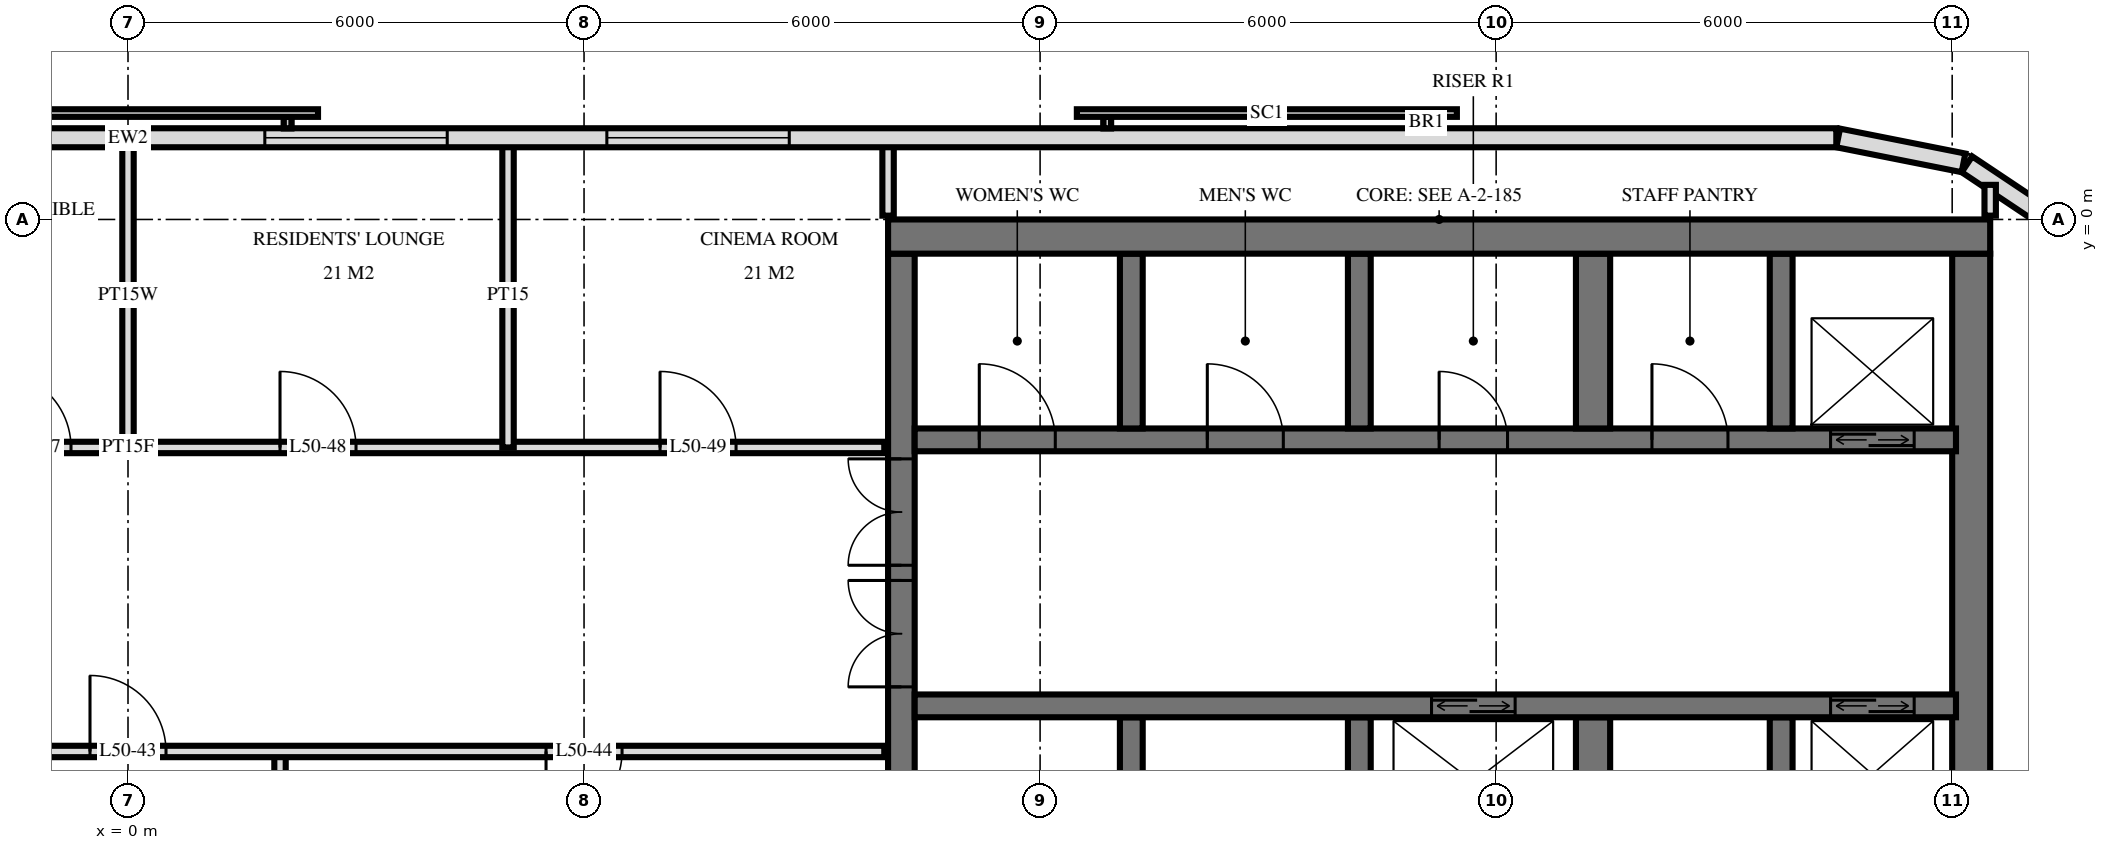
"""IFC4 building model, lengths in metres.
Left out: names, types, materials, properties, quantities, classifications, styles, units other than length and angle.
Written with IfcOpenShell. Run it as: python <this file> out.ifc"""

import sys

from ifc_helpers import new_model, si_unit, direction, frame, frame_2d, origin, place, context, subcontext, project, spatial, rectangle, extrude, element, fill, save


model = new_model("IFC4")
c1 = context("Model", 3, precision=1e-05, world=origin(), true_north=direction((0.0, 1.0)))
c2 = subcontext(c1, "Body", "Model", "MODEL_VIEW")
j1 = project(units=[si_unit("LENGTHUNIT", "METRE"), si_unit("PLANEANGLEUNIT", "RADIAN")], contexts=[c1])
p1 = place(None, origin())
s1 = spatial("IfcSite", under=j1, at=p1, CompositionType="ELEMENT")
p2 = place(p1, origin())
s2 = spatial("IfcBuilding", under=s1, at=p2, CompositionType="ELEMENT")
p3 = place(p2, frame((0.0, 0.0, 194.1)))
s3 = spatial("IfcBuildingStorey", under=s2, at=p3, CompositionType="ELEMENT", Elevation=194.1)
p4 = place(p3, frame((10.0, -0.225, 0.0), z_axis=(0.0, 0.0, 1.0), x_axis=(1.0, 0.0, 0.0)))
e1 = element("IfcWall", 1, at=p4, inside=s3, PredefinedType="SHEAR", context=c2, shape_type="SweptSolid", body=[
    extrude(rectangle(XDim=14.5, YDim=0.45, at=frame_2d((7.25, 0.0))), origin(), (0.0, 0.0, 1.0), 3.5),
])
p5 = place(p3, frame((10.175, -14.55, 0.0), z_axis=(0.0, 0.0, 1.0), x_axis=(0.0, 1.0, 0.0)))
e2 = element("IfcWall", 2, at=p5, inside=s3, PredefinedType="SHEAR", context=c2, shape_type="SweptSolid", body=[
    extrude(rectangle(XDim=14.1, YDim=0.35, at=frame_2d((7.05, 0.0))), origin(), (0.0, 0.0, 1.0), 3.5),
])
p6 = place(p5, frame((8.4, 0.0, 0.0)))
e3 = element("IfcOpeningElement", 3, at=p6, cuts=e2, PredefinedType="OPENING", context=c2, shape_type="SweptSolid", body=[
    extrude(rectangle(XDim=1.4, YDim=2.4, at=frame_2d((0.7, 1.2))), frame((0.0, 0.185, 0.0), z_axis=(0.0, -1.0, 0.0), x_axis=(1.0, 0.0, 0.0)), (0.0, 0.0, 1.0), 0.37),
])
p7 = place(p5, frame((10.0, 0.0, 0.0)))
e4 = element("IfcOpeningElement", 4, at=p7, cuts=e2, PredefinedType="OPENING", context=c2, shape_type="SweptSolid", body=[
    extrude(rectangle(XDim=1.4, YDim=2.4, at=frame_2d((0.7, 1.2))), frame((0.0, 0.185, 0.0), z_axis=(0.0, -1.0, 0.0), x_axis=(1.0, 0.0, 0.0)), (0.0, 0.0, 1.0), 0.37),
])
p8 = place(p5, frame((4.0, 0.0, 0.0)))
e5 = element("IfcOpeningElement", 5, at=p8, cuts=e2, PredefinedType="OPENING", context=c2, shape_type="SweptSolid", body=[
    extrude(rectangle(XDim=1.2, YDim=2.1, at=frame_2d((0.6, 1.05))), frame((0.0, 0.185, 0.0), z_axis=(0.0, -1.0, 0.0), x_axis=(1.0, 0.0, 0.0)), (0.0, 0.0, 1.0), 0.37),
])
p9 = place(p3, frame((24.25, -14.55, 0.0), z_axis=(0.0, 0.0, 1.0), x_axis=(0.0, 1.0, 0.0)))
e6 = element("IfcWall", 6, at=p9, inside=s3, PredefinedType="SHEAR", context=c2, shape_type="SweptSolid", body=[
    extrude(rectangle(XDim=14.1, YDim=0.5, at=frame_2d((7.05, 0.0))), origin(), (0.0, 0.0, 1.0), 3.5),
])
p10 = place(p3, frame((10.35, -2.9, 0.0), z_axis=(0.0, 0.0, 1.0), x_axis=(1.0, 0.0, 0.0)))
e7 = element("IfcWall", 7, at=p10, inside=s3, PredefinedType="SHEAR", context=c2, shape_type="SweptSolid", body=[
    extrude(rectangle(XDim=13.7, YDim=0.3, at=frame_2d((6.85, 0.0))), origin(), (0.0, 0.0, 1.0), 3.5),
])
p11 = place(p10, frame((12.05, 0.0, 0.0)))
e8 = element("IfcOpeningElement", 8, at=p11, cuts=e7, PredefinedType="OPENING", context=c2, shape_type="SweptSolid", body=[
    extrude(rectangle(XDim=1.1, YDim=2.1, at=frame_2d((0.55, 1.05))), frame((0.0, 0.16, 0.0), z_axis=(0.0, -1.0, 0.0), x_axis=(1.0, 0.0, 0.0)), (0.0, 0.0, 1.0), 0.32),
])
p12 = place(p10, frame((6.9, 0.0, 0.0)))
e9 = element("IfcOpeningElement", 9, at=p12, cuts=e7, PredefinedType="OPENING", context=c2, shape_type="SweptSolid", body=[
    extrude(rectangle(XDim=0.9, YDim=2.1, at=frame_2d((0.45, 1.05))), frame((0.0, 0.16, 0.0), z_axis=(0.0, -1.0, 0.0), x_axis=(1.0, 0.0, 0.0)), (0.0, 0.0, 1.0), 0.32),
])
p13 = place(p10, frame((0.85, 0.0, 0.0)))
e10 = element("IfcOpeningElement", 10, at=p13, cuts=e7, PredefinedType="OPENING", context=c2, shape_type="SweptSolid", body=[
    extrude(rectangle(XDim=1.0, YDim=2.1, at=frame_2d((0.5, 1.05))), frame((0.0, 0.16, 0.0), z_axis=(0.0, -1.0, 0.0), x_axis=(1.0, 0.0, 0.0)), (0.0, 0.0, 1.0), 0.32),
])
p14 = place(p10, frame((3.85, 0.0, 0.0)))
e11 = element("IfcOpeningElement", 11, at=p14, cuts=e7, PredefinedType="OPENING", context=c2, shape_type="SweptSolid", body=[
    extrude(rectangle(XDim=1.0, YDim=2.1, at=frame_2d((0.5, 1.05))), frame((0.0, 0.16, 0.0), z_axis=(0.0, -1.0, 0.0), x_axis=(1.0, 0.0, 0.0)), (0.0, 0.0, 1.0), 0.32),
])
p15 = place(p10, frame((9.7, 0.0, 0.0)))
e12 = element("IfcOpeningElement", 12, at=p15, cuts=e7, PredefinedType="OPENING", context=c2, shape_type="SweptSolid", body=[
    extrude(rectangle(XDim=1.0, YDim=2.1, at=frame_2d((0.5, 1.05))), frame((0.0, 0.16, 0.0), z_axis=(0.0, -1.0, 0.0), x_axis=(1.0, 0.0, 0.0)), (0.0, 0.0, 1.0), 0.32),
])
p16 = place(p3, frame((10.35, -6.4, 0.0), z_axis=(0.0, 0.0, 1.0), x_axis=(1.0, 0.0, 0.0)))
e13 = element("IfcWall", 13, at=p16, inside=s3, PredefinedType="SHEAR", context=c2, shape_type="SweptSolid", body=[
    extrude(rectangle(XDim=13.7, YDim=0.3, at=frame_2d((6.85, 0.0))), origin(), (0.0, 0.0, 1.0), 3.5),
])
p17 = place(p16, frame((12.05, 0.0, 0.0)))
e14 = element("IfcOpeningElement", 14, at=p17, cuts=e13, PredefinedType="OPENING", context=c2, shape_type="SweptSolid", body=[
    extrude(rectangle(XDim=1.1, YDim=2.1, at=frame_2d((0.55, 1.05))), frame((0.0, 0.16, 0.0), z_axis=(0.0, -1.0, 0.0), x_axis=(1.0, 0.0, 0.0)), (0.0, 0.0, 1.0), 0.32),
])
p18 = place(p16, frame((6.8, 0.0, 0.0)))
e15 = element("IfcOpeningElement", 15, at=p18, cuts=e13, PredefinedType="OPENING", context=c2, shape_type="SweptSolid", body=[
    extrude(rectangle(XDim=1.1, YDim=2.1, at=frame_2d((0.55, 1.05))), frame((0.0, 0.16, 0.0), z_axis=(0.0, -1.0, 0.0), x_axis=(1.0, 0.0, 0.0)), (0.0, 0.0, 1.0), 0.32),
])
for number, where, z_axis, x_axis in (
    (16, (13.2, -2.75, 0.0), (0.0, 0.0, 1.0), (0.0, 1.0, 0.0)),
    (17, (13.2, -8.85, 0.0), (0.0, 0.0, 1.0), (0.0, 1.0, 0.0)),
    (18, (16.2, -2.75, 0.0), (0.0, 0.0, 1.0), (0.0, 1.0, 0.0)),
    (19, (16.2, -8.85, 0.0), (0.0, 0.0, 1.0), (0.0, 1.0, 0.0)),
):
    element("IfcWall", number, at=place(p3, frame(where, z_axis=z_axis, x_axis=x_axis)), inside=s3, PredefinedType="SHEAR", context=c2, shape_type="SweptSolid", body=[
        extrude(rectangle(XDim=2.3, YDim=0.3, at=frame_2d((1.15, 0.0))), origin(), (0.0, 0.0, 1.0), 3.5),
    ])
for number, where, z_axis, x_axis in (
    (20, (19.275, -2.75, 0.0), (0.0, 0.0, 1.0), (0.0, 1.0, 0.0)),
    (21, (19.275, -8.85, 0.0), (0.0, 0.0, 1.0), (0.0, 1.0, 0.0)),
):
    element("IfcWall", number, at=place(p3, frame(where, z_axis=z_axis, x_axis=x_axis)), inside=s3, PredefinedType="SHEAR", context=c2, shape_type="SweptSolid", body=[
        extrude(rectangle(XDim=2.3, YDim=0.45, at=frame_2d((1.15, 0.0))), origin(), (0.0, 0.0, 1.0), 3.5),
    ])
for number, where, z_axis, x_axis in (
    (22, (21.75, -2.75, 0.0), (0.0, 0.0, 1.0), (0.0, 1.0, 0.0)),
    (23, (21.75, -8.85, 0.0), (0.0, 0.0, 1.0), (0.0, 1.0, 0.0)),
):
    element("IfcWall", number, at=place(p3, frame(where, z_axis=z_axis, x_axis=x_axis)), inside=s3, PredefinedType="SHEAR", context=c2, shape_type="SweptSolid", body=[
        extrude(rectangle(XDim=2.3, YDim=0.3, at=frame_2d((1.15, 0.0))), origin(), (0.0, 0.0, 1.0), 3.5),
    ])
p19 = place(p3, frame((25.571, -0.194, 0.0), z_axis=(0.0, 0.0, 1.0), x_axis=(-0.831482937015, 0.55555029066, 0.0)))
e24 = element("IfcWall", 24, at=p19, inside=s3, PredefinedType="SOLIDWALL", context=c2, shape_type="SweptSolid", body=[
    extrude(rectangle(XDim=1.656, YDim=0.25, at=frame_2d((0.828, 0.0))), origin(), (0.0, 0.0, 1.0), 3.22),
])
p20 = place(p3, frame((24.149, 0.745, 0.0), z_axis=(0.0, 0.0, 1.0), x_axis=(-0.980803419081, 0.194999110559, 0.0)))
e25 = element("IfcWall", 25, at=p20, inside=s3, PredefinedType="SOLIDWALL", context=c2, shape_type="SweptSolid", body=[
    extrude(rectangle(XDim=1.681, YDim=0.25, at=frame_2d((0.841, 0.0))), origin(), (0.0, 0.0, 1.0), 3.22),
])
p21 = place(p3, frame((22.475, 1.075, 0.0), z_axis=(0.0, 0.0, 1.0), x_axis=(-1.0, 0.0, 0.0)))
e26 = element("IfcWall", 26, at=p21, inside=s3, PredefinedType="SOLIDWALL", context=c2, shape_type="SweptSolid", body=[
    extrude(rectangle(XDim=44.951, YDim=0.25, at=frame_2d((22.475, 0.0))), origin(), (0.0, 0.0, 1.0), 3.22),
])
p22 = place(p21, frame((13.775, 0.0, 0.9)))
e27 = element("IfcOpeningElement", 27, at=p22, cuts=e26, PredefinedType="OPENING", context=c2, shape_type="SweptSolid", body=[
    extrude(rectangle(XDim=2.4, YDim=1.5, at=frame_2d((1.2, 0.75))), frame((0.0, 0.135, 0.0), z_axis=(0.0, -1.0, 0.0), x_axis=(1.0, 0.0, 0.0)), (0.0, 0.0, 1.0), 0.27),
])
p23 = place(p21, frame((18.275, 0.0, 0.9)))
e28 = element("IfcOpeningElement", 28, at=p23, cuts=e26, PredefinedType="OPENING", context=c2, shape_type="SweptSolid", body=[
    extrude(rectangle(XDim=2.4, YDim=1.5, at=frame_2d((1.2, 0.75))), frame((0.0, 0.135, 0.0), z_axis=(0.0, -1.0, 0.0), x_axis=(1.0, 0.0, 0.0)), (0.0, 0.0, 1.0), 0.27),
])
p24 = place(p21, frame((29.025, 0.0, 0.9)))
e29 = element("IfcOpeningElement", 29, at=p24, cuts=e26, PredefinedType="OPENING", context=c2, shape_type="SweptSolid", body=[
    extrude(rectangle(XDim=2.4, YDim=1.5, at=frame_2d((1.2, 0.75))), frame((0.0, 0.135, 0.0), z_axis=(0.0, -1.0, 0.0), x_axis=(1.0, 0.0, 0.0)), (0.0, 0.0, 1.0), 0.27),
])
p25 = place(p3, frame((24.5, 0.05, 0.0), z_axis=(0.0, 0.0, 1.0), x_axis=(0.0, 1.0, 0.0)))
e30 = element("IfcWall", 30, at=p25, inside=s3, PredefinedType="PARTITIONING", context=c2, shape_type="SweptSolid", body=[
    extrude(rectangle(XDim=0.405, YDim=0.15, at=frame_2d((0.203, 0.0))), origin(), (0.0, 0.0, 1.0), 3.22),
])
p26 = place(p3, frame((10.0, 0.05, 0.0), z_axis=(0.0, 0.0, 1.0), x_axis=(0.0, 1.0, 0.0)))
e31 = element("IfcWall", 31, at=p26, inside=s3, PredefinedType="PARTITIONING", context=c2, shape_type="SweptSolid", body=[
    extrude(rectangle(XDim=0.97, YDim=0.15, at=frame_2d((0.485, 0.0))), origin(), (0.0, 0.0, 1.0), 3.22),
])
p27 = place(p3, frame((5.0, -3.0, 0.0), z_axis=(0.0, 0.0, 1.0), x_axis=(0.0, 1.0, 0.0)))
e32 = element("IfcWall", 32, at=p27, inside=s3, PredefinedType="PARTITIONING", context=c2, shape_type="SweptSolid", body=[
    extrude(rectangle(XDim=4.02, YDim=0.15, at=frame_2d((2.01, 0.0))), origin(), (0.0, 0.0, 1.0), 3.22),
])
p28 = place(p3, frame((2.0, -11.0, 0.0), z_axis=(0.0, 0.0, 1.0), x_axis=(0.0, 1.0, 0.0)))
e33 = element("IfcWall", 33, at=p28, inside=s3, PredefinedType="PARTITIONING", context=c2, shape_type="SweptSolid", body=[
    extrude(rectangle(XDim=4.0, YDim=0.15, at=frame_2d((2.0, 0.0))), origin(), (0.0, 0.0, 1.0), 3.22),
])
p29 = place(p3, frame((0.0, -3.0, 0.0), z_axis=(0.0, 0.0, 1.0), x_axis=(0.0, 1.0, 0.0)))
e34 = element("IfcWall", 34, at=p29, inside=s3, PredefinedType="PLUMBINGWALL", context=c2, shape_type="SweptSolid", body=[
    extrude(rectangle(XDim=4.02, YDim=0.15, at=frame_2d((2.01, 0.0))), origin(), (0.0, 0.0, 1.0), 3.22),
])
p30 = place(p3, frame((-9.95, -7.0, 0.0), z_axis=(0.0, 0.0, 1.0), x_axis=(1.0, 0.0, 0.0)))
e35 = element("IfcWall", 35, at=p30, inside=s3, PredefinedType="PARTITIONING", context=c2, shape_type="SweptSolid", body=[
    extrude(rectangle(XDim=19.9, YDim=0.15, at=frame_2d((9.95, 0.0))), origin(), (0.0, 0.0, 1.0), 3.22),
])
p31 = place(p30, frame((9.45, 0.0, 0.0)))
e36 = element("IfcOpeningElement", 36, at=p31, cuts=e35, PredefinedType="OPENING", context=c2, shape_type="SweptSolid", body=[
    extrude(rectangle(XDim=1.0, YDim=2.1, at=frame_2d((0.5, 1.05))), frame((0.0, 0.085, 0.0), z_axis=(0.0, -1.0, 0.0), x_axis=(1.0, 0.0, 0.0)), (0.0, 0.0, 1.0), 0.17),
])
p32 = place(p30, frame((15.45, 0.0, 0.0)))
e37 = element("IfcOpeningElement", 37, at=p32, cuts=e35, PredefinedType="OPENING", context=c2, shape_type="SweptSolid", body=[
    extrude(rectangle(XDim=1.0, YDim=2.1, at=frame_2d((0.5, 1.05))), frame((0.0, 0.085, 0.0), z_axis=(0.0, -1.0, 0.0), x_axis=(1.0, 0.0, 0.0)), (0.0, 0.0, 1.0), 0.17),
])
p33 = place(p3, frame((-9.95, -3.0, 0.0), z_axis=(0.0, 0.0, 1.0), x_axis=(1.0, 0.0, 0.0)))
e38 = element("IfcWall", 38, at=p33, inside=s3, PredefinedType="PARTITIONING", context=c2, shape_type="SweptSolid", body=[
    extrude(rectangle(XDim=19.9, YDim=0.15, at=frame_2d((9.95, 0.0))), origin(), (0.0, 0.0, 1.0), 3.22),
])
p34 = place(p33, frame((1.7, 0.0, 0.0)))
e39 = element("IfcOpeningElement", 39, at=p34, cuts=e38, PredefinedType="OPENING", context=c2, shape_type="SweptSolid", body=[
    extrude(rectangle(XDim=1.0, YDim=2.1, at=frame_2d((0.5, 1.05))), frame((0.0, 0.085, 0.0), z_axis=(0.0, -1.0, 0.0), x_axis=(1.0, 0.0, 0.0)), (0.0, 0.0, 1.0), 0.17),
])
p35 = place(p33, frame((5.45, 0.0, 0.0)))
e40 = element("IfcOpeningElement", 40, at=p35, cuts=e38, PredefinedType="OPENING", context=c2, shape_type="SweptSolid", body=[
    extrude(rectangle(XDim=1.0, YDim=2.1, at=frame_2d((0.5, 1.05))), frame((0.0, 0.085, 0.0), z_axis=(0.0, -1.0, 0.0), x_axis=(1.0, 0.0, 0.0)), (0.0, 0.0, 1.0), 0.17),
])
p36 = place(p33, frame((8.2, 0.0, 0.0)))
e41 = element("IfcOpeningElement", 41, at=p36, cuts=e38, PredefinedType="OPENING", context=c2, shape_type="SweptSolid", body=[
    extrude(rectangle(XDim=1.0, YDim=2.1, at=frame_2d((0.5, 1.05))), frame((0.0, 0.085, 0.0), z_axis=(0.0, -1.0, 0.0), x_axis=(1.0, 0.0, 0.0)), (0.0, 0.0, 1.0), 0.17),
])
p37 = place(p33, frame((11.95, 0.0, 0.0)))
e42 = element("IfcOpeningElement", 42, at=p37, cuts=e38, PredefinedType="OPENING", context=c2, shape_type="SweptSolid", body=[
    extrude(rectangle(XDim=1.0, YDim=2.1, at=frame_2d((0.5, 1.05))), frame((0.0, 0.085, 0.0), z_axis=(0.0, -1.0, 0.0), x_axis=(1.0, 0.0, 0.0)), (0.0, 0.0, 1.0), 0.17),
])
p38 = place(p33, frame((16.95, 0.0, 0.0)))
e43 = element("IfcOpeningElement", 43, at=p38, cuts=e38, PredefinedType="OPENING", context=c2, shape_type="SweptSolid", body=[
    extrude(rectangle(XDim=1.0, YDim=2.1, at=frame_2d((0.5, 1.05))), frame((0.0, 0.085, 0.0), z_axis=(0.0, -1.0, 0.0), x_axis=(1.0, 0.0, 0.0)), (0.0, 0.0, 1.0), 0.17),
])
p39 = place(p22, origin())
e44 = element("IfcWindow", 44, at=p39, inside=s3, PartitioningType="SINGLE_PANEL", PredefinedType="WINDOW", context=c2, shape_type="SweptSolid", body=[
    extrude(rectangle(XDim=2.4, YDim=1.5, at=frame_2d((1.2, 0.75))), frame((0.0, 0.03, 0.0), z_axis=(0.0, -1.0, 0.0), x_axis=(1.0, 0.0, 0.0)), (0.0, 0.0, 1.0), 0.06),
])
fill(e27, e44)
p40 = place(p23, origin())
e45 = element("IfcWindow", 45, at=p40, inside=s3, PartitioningType="SINGLE_PANEL", PredefinedType="WINDOW", context=c2, shape_type="SweptSolid", body=[
    extrude(rectangle(XDim=2.4, YDim=1.5, at=frame_2d((1.2, 0.75))), frame((0.0, 0.03, 0.0), z_axis=(0.0, -1.0, 0.0), x_axis=(1.0, 0.0, 0.0)), (0.0, 0.0, 1.0), 0.06),
])
fill(e28, e45)
p41 = place(p11, origin())
e46 = element("IfcDoor", 46, at=p41, inside=s3, OperationType="DOUBLE_DOOR_SLIDING", PredefinedType="USERDEFINED", context=c2, shape_type="SweptSolid", body=[
    extrude(rectangle(XDim=1.1, YDim=2.1, at=frame_2d((0.55, 1.05))), frame((0.0, 0.025, 0.0), z_axis=(0.0, -1.0, 0.0), x_axis=(1.0, 0.0, 0.0)), (0.0, 0.0, 1.0), 0.05),
])
fill(e8, e46)
p42 = place(p17, origin())
e47 = element("IfcDoor", 47, at=p42, inside=s3, OperationType="DOUBLE_DOOR_SLIDING", PredefinedType="USERDEFINED", context=c2, shape_type="SweptSolid", body=[
    extrude(rectangle(XDim=1.1, YDim=2.1, at=frame_2d((0.55, 1.05))), frame((0.0, 0.025, 0.0), z_axis=(0.0, -1.0, 0.0), x_axis=(1.0, 0.0, 0.0)), (0.0, 0.0, 1.0), 0.05),
])
fill(e14, e47)
p43 = place(p18, origin())
e48 = element("IfcDoor", 48, at=p43, inside=s3, OperationType="DOUBLE_DOOR_SLIDING", PredefinedType="USERDEFINED", context=c2, shape_type="SweptSolid", body=[
    extrude(rectangle(XDim=1.1, YDim=2.1, at=frame_2d((0.55, 1.05))), frame((0.0, 0.025, 0.0), z_axis=(0.0, -1.0, 0.0), x_axis=(1.0, 0.0, 0.0)), (0.0, 0.0, 1.0), 0.05),
])
fill(e15, e48)
p44 = place(p6, origin())
e49 = element("IfcDoor", 49, at=p44, inside=s3, OperationType="DOUBLE_DOOR_SINGLE_SWING", PredefinedType="DOOR", context=c2, shape_type="SweptSolid", body=[
    extrude(rectangle(XDim=1.4, YDim=2.4, at=frame_2d((0.7, 1.2))), frame((0.0, 0.025, 0.0), z_axis=(0.0, -1.0, 0.0), x_axis=(1.0, 0.0, 0.0)), (0.0, 0.0, 1.0), 0.05),
])
fill(e3, e49)
p45 = place(p7, origin())
e50 = element("IfcDoor", 50, at=p45, inside=s3, OperationType="DOUBLE_DOOR_SINGLE_SWING", PredefinedType="DOOR", context=c2, shape_type="SweptSolid", body=[
    extrude(rectangle(XDim=1.4, YDim=2.4, at=frame_2d((0.7, 1.2))), frame((0.0, 0.025, 0.0), z_axis=(0.0, -1.0, 0.0), x_axis=(1.0, 0.0, 0.0)), (0.0, 0.0, 1.0), 0.05),
])
fill(e4, e50)
p46 = place(p12, origin())
e51 = element("IfcDoor", 51, at=p46, inside=s3, OperationType="SINGLE_SWING_RIGHT", PredefinedType="DOOR", context=c2, shape_type="SweptSolid", body=[
    extrude(rectangle(XDim=0.9, YDim=2.1, at=frame_2d((0.45, 1.05))), frame((0.0, 0.025, 0.0), z_axis=(0.0, -1.0, 0.0), x_axis=(1.0, 0.0, 0.0)), (0.0, 0.0, 1.0), 0.05),
])
fill(e9, e51)
p47 = place(p13, origin())
e52 = element("IfcDoor", 52, at=p47, inside=s3, OperationType="SINGLE_SWING_RIGHT", PredefinedType="DOOR", context=c2, shape_type="SweptSolid", body=[
    extrude(rectangle(XDim=1.0, YDim=2.1, at=frame_2d((0.5, 1.05))), frame((0.0, 0.025, 0.0), z_axis=(0.0, -1.0, 0.0), x_axis=(1.0, 0.0, 0.0)), (0.0, 0.0, 1.0), 0.05),
])
fill(e10, e52)
p48 = place(p14, origin())
e53 = element("IfcDoor", 53, at=p48, inside=s3, OperationType="SINGLE_SWING_RIGHT", PredefinedType="DOOR", context=c2, shape_type="SweptSolid", body=[
    extrude(rectangle(XDim=1.0, YDim=2.1, at=frame_2d((0.5, 1.05))), frame((0.0, 0.025, 0.0), z_axis=(0.0, -1.0, 0.0), x_axis=(1.0, 0.0, 0.0)), (0.0, 0.0, 1.0), 0.05),
])
fill(e11, e53)
p49 = place(p15, origin())
e54 = element("IfcDoor", 54, at=p49, inside=s3, OperationType="SINGLE_SWING_RIGHT", PredefinedType="DOOR", context=c2, shape_type="SweptSolid", body=[
    extrude(rectangle(XDim=1.0, YDim=2.1, at=frame_2d((0.5, 1.05))), frame((0.0, 0.025, 0.0), z_axis=(0.0, -1.0, 0.0), x_axis=(1.0, 0.0, 0.0)), (0.0, 0.0, 1.0), 0.05),
])
fill(e12, e54)
p50 = place(p31, origin())
e55 = element("IfcDoor", 55, at=p50, inside=s3, OperationType="SINGLE_SWING_RIGHT", PredefinedType="DOOR", context=c2, shape_type="SweptSolid", body=[
    extrude(rectangle(XDim=1.0, YDim=2.1, at=frame_2d((0.5, 1.05))), frame((0.0, 0.025, 0.0), z_axis=(0.0, -1.0, 0.0), x_axis=(1.0, 0.0, 0.0)), (0.0, 0.0, 1.0), 0.05),
])
fill(e36, e55)
p51 = place(p32, frame((0.5, 0.0, 0.0), z_axis=(0.0, 0.0, 1.0), x_axis=(-1.0, 0.0, 0.0)))
e56 = element("IfcDoor", 56, at=p51, inside=s3, OperationType="SINGLE_SWING_LEFT", PredefinedType="DOOR", context=c2, shape_type="SweptSolid", body=[
    extrude(rectangle(XDim=1.0, YDim=2.1, at=frame_2d((0.0, 1.05))), frame((0.0, -0.025, 0.0), z_axis=(0.0, 1.0, 0.0), x_axis=(-1.0, 0.0, 0.0)), (0.0, 0.0, 1.0), 0.05),
])
fill(e37, e56)
p52 = place(p36, origin())
e57 = element("IfcDoor", 57, at=p52, inside=s3, OperationType="SINGLE_SWING_RIGHT", PredefinedType="DOOR", context=c2, shape_type="SweptSolid", body=[
    extrude(rectangle(XDim=1.0, YDim=2.1, at=frame_2d((0.5, 1.05))), frame((0.0, 0.025, 0.0), z_axis=(0.0, -1.0, 0.0), x_axis=(1.0, 0.0, 0.0)), (0.0, 0.0, 1.0), 0.05),
])
fill(e41, e57)
p53 = place(p37, origin())
e58 = element("IfcDoor", 58, at=p53, inside=s3, OperationType="SINGLE_SWING_RIGHT", PredefinedType="DOOR", context=c2, shape_type="SweptSolid", body=[
    extrude(rectangle(XDim=1.0, YDim=2.1, at=frame_2d((0.5, 1.05))), frame((0.0, 0.025, 0.0), z_axis=(0.0, -1.0, 0.0), x_axis=(1.0, 0.0, 0.0)), (0.0, 0.0, 1.0), 0.05),
])
fill(e42, e58)
p54 = place(p38, origin())
e59 = element("IfcDoor", 59, at=p54, inside=s3, OperationType="SINGLE_SWING_RIGHT", PredefinedType="DOOR", context=c2, shape_type="SweptSolid", body=[
    extrude(rectangle(XDim=1.0, YDim=2.1, at=frame_2d((0.5, 1.05))), frame((0.0, 0.025, 0.0), z_axis=(0.0, -1.0, 0.0), x_axis=(1.0, 0.0, 0.0)), (0.0, 0.0, 1.0), 0.05),
])
fill(e43, e59)
save(model, sys.argv[1])
